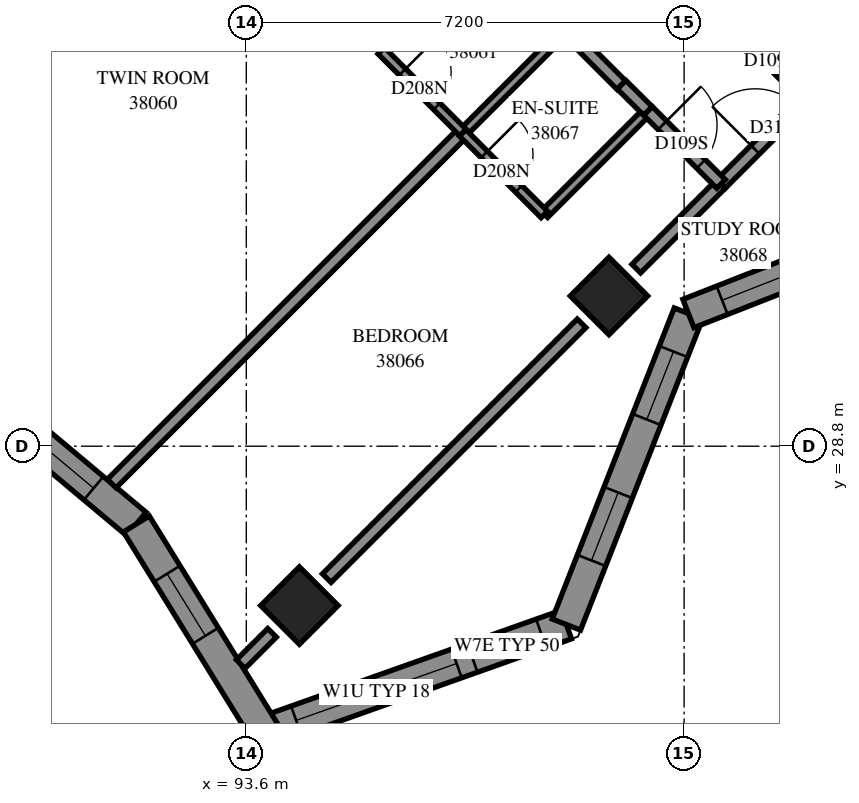
"""IFC4 building model, lengths in metres.
Left out: names, types, materials, properties, quantities, classifications, styles, units other than length and angle.
Written with IfcOpenShell. Run it as: python <this file> out.ifc"""

import sys

from ifc_helpers import new_model, si_unit, direction, frame, frame_2d, origin, origin_2d, place, context, subcontext, project, spatial, polyline, rectangle, outline, extrude, element, fill, save


model = new_model("IFC4")
c1 = context("Model", 3, precision=1e-05, world=origin(), true_north=direction((0.0, 1.0)))
c2 = subcontext(c1, "Body", "Model", "MODEL_VIEW")
j1 = project(units=[si_unit("LENGTHUNIT", "METRE"), si_unit("PLANEANGLEUNIT", "RADIAN")], contexts=[c1])
p1 = place(None, origin())
s1 = spatial("IfcSite", under=j1, at=p1, CompositionType="ELEMENT")
p2 = place(p1, origin())
s2 = spatial("IfcBuilding", under=s1, at=p2, CompositionType="ELEMENT")
p3 = place(p2, frame((0.0, 0.0, 142.2)))
s3 = spatial("IfcBuildingStorey", under=s2, at=p3, CompositionType="ELEMENT", Elevation=142.2)
for number, where, z_axis, x_axis in (
    (1, (99.565, 31.271, 0.0), (0.0, 0.0, 1.0), (0.707, -0.707, 0.0)),
    (2, (94.474, 26.18, 0.0), (0.0, 0.0, 1.0), (0.707, -0.707, 0.0)),
):
    element("IfcColumn", number, at=place(p3, frame(where, z_axis=z_axis, x_axis=x_axis)), inside=s3, PredefinedType="COLUMN", context=c2, shape_type="SweptSolid", body=[
        extrude(rectangle(XDim=0.9, YDim=0.9, at=origin_2d()), origin(), (0.0, 0.0, 1.0), 3.1),
    ])
p4 = place(p3, frame((93.901, 24.106, 0.0), z_axis=(0.0, 0.0, 1.0), x_axis=(0.9424200238, 0.3344316056, 0.0)))
e3 = element("IfcWall", 3, at=p4, inside=s3, PredefinedType="SOLIDWALL", context=c2, shape_type="SweptSolid", body=[
    extrude(outline(polyline([(-0.202, -0.25), (5.381, -0.25), (5.152, 0.25), (0.202, 0.25), (-0.202, -0.25)])), origin(), (0.0, 0.0, 1.0), 3.1),
])
p5 = place(p4, frame((0.551, 0.0, 0.45)))
e4 = element("IfcOpeningElement", 4, at=p5, cuts=e3, PredefinedType="OPENING", context=c2, shape_type="SweptSolid", body=[
    extrude(rectangle(XDim=2.8, YDim=2.5, at=frame_2d((1.4, 1.25))), frame((0.0, 0.26, 0.0), z_axis=(0.0, -1.0, 0.0), x_axis=(1.0, 0.0, 0.0)), (0.0, 0.0, 1.0), 0.52),
])
p6 = place(p4, frame((3.627, 0.0, 0.45)))
e5 = element("IfcOpeningElement", 5, at=p6, cuts=e3, PredefinedType="OPENING", context=c2, shape_type="SweptSolid", body=[
    extrude(rectangle(XDim=1.2, YDim=2.5, at=frame_2d((0.6, 1.25))), frame((0.0, 0.26, 0.0), z_axis=(0.0, -1.0, 0.0), x_axis=(1.0, 0.0, 0.0)), (0.0, 0.0, 1.0), 0.52),
])
p7 = place(p3, frame((98.864, 25.867, 0.0), z_axis=(0.0, 0.0, 1.0), x_axis=(0.3652007286, 0.9309287985, 0.0)))
e6 = element("IfcWall", 6, at=p7, inside=s3, PredefinedType="SOLIDWALL", context=c2, shape_type="SweptSolid", body=[
    extrude(outline(polyline([(-0.114, -0.25), (5.385, -0.25), (5.604, 0.25), (0.114, 0.25), (-0.114, -0.25)])), origin(), (0.0, 0.0, 1.0), 3.1),
])
p8 = place(p7, frame((1.132, 0.0, 0.45)))
e7 = element("IfcOpeningElement", 7, at=p8, cuts=e6, PredefinedType="OPENING", context=c2, shape_type="SweptSolid", body=[
    extrude(rectangle(XDim=1.2, YDim=2.5, at=frame_2d((0.6, 1.25))), frame((0.0, 0.26, 0.0), z_axis=(0.0, -1.0, 0.0), x_axis=(1.0, 0.0, 0.0)), (0.0, 0.0, 1.0), 0.52),
])
p9 = place(p7, frame((3.622, 0.0, 0.45)))
e8 = element("IfcOpeningElement", 8, at=p9, cuts=e6, PredefinedType="OPENING", context=c2, shape_type="SweptSolid", body=[
    extrude(rectangle(XDim=1.2, YDim=2.5, at=frame_2d((0.6, 1.25))), frame((0.0, 0.26, 0.0), z_axis=(0.0, -1.0, 0.0), x_axis=(1.0, 0.0, 0.0)), (0.0, 0.0, 1.0), 0.52),
])
p10 = place(p3, frame((100.871, 30.982, 0.0), z_axis=(0.0, 0.0, 1.0), x_axis=(0.9309312258, 0.3651945412, 0.0)))
e9 = element("IfcWall", 9, at=p10, inside=s3, PredefinedType="SOLIDWALL", context=c2, shape_type="SweptSolid", body=[
    extrude(outline(polyline([(0.109, -0.25), (5.609, -0.25), (5.38, 0.25), (-0.109, 0.25), (0.109, -0.25)])), origin(), (0.0, 0.0, 1.0), 3.1),
])
p11 = place(p10, frame((0.596, 0.0, 0.45)))
e10 = element("IfcOpeningElement", 10, at=p11, cuts=e9, PredefinedType="OPENING", context=c2, shape_type="SweptSolid", body=[
    extrude(rectangle(XDim=2.8, YDim=2.5, at=frame_2d((1.4, 1.25))), frame((0.0, 0.26, 0.0), z_axis=(0.0, -1.0, 0.0), x_axis=(1.0, 0.0, 0.0)), (0.0, 0.0, 1.0), 0.52),
])
p12 = place(p3, frame((88.65, 30.15, 0.0), z_axis=(0.0, 0.0, 1.0), x_axis=(0.7669272434, -0.6417340597, 0.0)))
e11 = element("IfcWall", 11, at=p12, inside=s3, PredefinedType="SOLIDWALL", context=c2, shape_type="SweptSolid", body=[
    extrude(outline(polyline([(-0.022, -0.25), (4.056, -0.25), (4.137, 0.25), (0.022, 0.25), (-0.022, -0.25)])), origin(), (0.0, 0.0, 1.0), 3.1),
])
p13 = place(p12, frame((0.38, 0.0, 0.45)))
e12 = element("IfcOpeningElement", 12, at=p13, cuts=e11, PredefinedType="OPENING", context=c2, shape_type="SweptSolid", body=[
    extrude(rectangle(XDim=2.8, YDim=2.5, at=frame_2d((1.4, 1.25))), frame((0.0, 0.26, 0.0), z_axis=(0.0, -1.0, 0.0), x_axis=(1.0, 0.0, 0.0)), (0.0, 0.0, 1.0), 0.52),
])
p14 = place(p3, frame((91.792, 27.521, 0.0), z_axis=(0.0, 0.0, 1.0), x_axis=(0.5253300119, -0.8508985713, 0.0)))
e13 = element("IfcWall", 13, at=p14, inside=s3, PredefinedType="SOLIDWALL", context=c2, shape_type="SweptSolid", body=[
    extrude(outline(polyline([(0.041, -0.25), (4.215, -0.25), (3.811, 0.25), (-0.041, 0.25), (0.041, -0.25)])), origin(), (0.0, 0.0, 1.0), 3.1),
])
p15 = place(p14, frame((0.962, 0.0, 0.45)))
e14 = element("IfcOpeningElement", 14, at=p15, cuts=e13, PredefinedType="OPENING", context=c2, shape_type="SweptSolid", body=[
    extrude(rectangle(XDim=1.2, YDim=2.5, at=frame_2d((0.6, 1.25))), frame((0.0, 0.26, 0.0), z_axis=(0.0, -1.0, 0.0), x_axis=(1.0, 0.0, 0.0)), (0.0, 0.0, 1.0), 0.52),
])
p16 = place(p3, frame((93.127, 41.379, 0.0), z_axis=(0.0, 0.0, 1.0), x_axis=(0.7071067812, -0.7071067812, 0.0)))
e15 = element("IfcWall", 15, at=p16, inside=s3, PredefinedType="PARTITIONING", context=c2, shape_type="SweptSolid", body=[
    extrude(rectangle(XDim=9.39, YDim=0.2, at=frame_2d((4.695, 0.0))), origin(), (0.0, 0.0, 1.0), 3.1),
])
p17 = place(p16, frame((3.2, 0.0, 0.0)))
e16 = element("IfcOpeningElement", 16, at=p17, cuts=e15, PredefinedType="OPENING", context=c2, shape_type="SweptSolid", body=[
    extrude(rectangle(XDim=0.9, YDim=2.1, at=frame_2d((0.45, 1.05))), frame((0.0, 0.11, 0.0), z_axis=(0.0, -1.0, 0.0), x_axis=(1.0, 0.0, 0.0)), (0.0, 0.0, 1.0), 0.22),
])
p18 = place(p3, frame((86.837, 35.091, 0.0), z_axis=(0.0, 0.0, 1.0), x_axis=(0.7071067812, 0.7071067812, 0.0)))
e17 = element("IfcWall", 17, at=p18, inside=s3, PredefinedType="PARTITIONING", context=c2, shape_type="SweptSolid", body=[
    extrude(rectangle(XDim=8.898, YDim=0.2, at=frame_2d((4.449, 0.0))), origin(), (0.0, 0.0, 1.0), 3.1),
])
p19 = place(p18, frame((7.7, 0.0, 0.0)))
e18 = element("IfcOpeningElement", 18, at=p19, cuts=e17, PredefinedType="OPENING", context=c2, shape_type="SweptSolid", body=[
    extrude(rectangle(XDim=1.0, YDim=2.1, at=frame_2d((0.5, 1.05))), frame((0.0, 0.11, 0.0), z_axis=(0.0, -1.0, 0.0), x_axis=(1.0, 0.0, 0.0)), (0.0, 0.0, 1.0), 0.22),
])
p20 = place(p3, frame((91.387, 28.186, 0.0), z_axis=(0.0, 0.0, 1.0), x_axis=(0.7071067812, 0.7071067812, 0.0)))
e19 = element("IfcWall", 19, at=p20, inside=s3, PredefinedType="PARTITIONING", context=c2, shape_type="SweptSolid", body=[
    extrude(rectangle(XDim=8.164, YDim=0.2, at=frame_2d((4.082, 0.0))), origin(), (0.0, 0.0, 1.0), 3.1),
])
p21 = place(p3, frame((94.923, 26.631, 0.0), z_axis=(0.0, 0.0, 1.0), x_axis=(0.7071067812, 0.7071067812, 0.0)))
e20 = element("IfcWall", 20, at=p21, inside=s3, PredefinedType="PARTITIONING", context=c2, shape_type="SweptSolid", body=[
    extrude(rectangle(XDim=5.926, YDim=0.2, at=frame_2d((2.963, 0.0))), origin(), (0.0, 0.0, 1.0), 2.6),
])
p22 = place(p3, frame((98.503, 32.615, 0.0), z_axis=(0.0, 0.0, 1.0), x_axis=(0.7071067812, 0.7071067812, 0.0)))
e21 = element("IfcWall", 21, at=p22, inside=s3, PredefinedType="PARTITIONING", context=c2, shape_type="SweptSolid", body=[
    extrude(rectangle(XDim=2.401, YDim=0.15, at=frame_2d((1.201, 0.0))), origin(), (0.0, 0.0, 1.0), 3.1),
])
p23 = place(p3, frame((97.163, 33.955, 0.0), z_axis=(0.0, 0.0, 1.0), x_axis=(0.7075233388, 0.706689978, 0.0)))
e22 = element("IfcWall", 22, at=p23, inside=s3, PredefinedType="PARTITIONING", context=c2, shape_type="SweptSolid", body=[
    extrude(rectangle(XDim=2.4, YDim=0.15, at=frame_2d((1.2, 0.0))), origin(), (0.0, 0.0, 1.0), 3.1),
])
p24 = place(p3, frame((95.817, 35.303, 0.0), z_axis=(0.0, 0.0, 1.0), x_axis=(0.7071067812, 0.7071067812, 0.0)))
e23 = element("IfcWall", 23, at=p24, inside=s3, PredefinedType="PARTITIONING", context=c2, shape_type="SweptSolid", body=[
    extrude(rectangle(XDim=2.398, YDim=0.15, at=frame_2d((1.199, 0.0))), origin(), (0.0, 0.0, 1.0), 3.1),
])
p25 = place(p3, frame((101.403, 33.111, 0.0), z_axis=(0.0, 0.0, 1.0), x_axis=(0.7071067812, 0.7071067812, 0.0)))
e24 = element("IfcWall", 24, at=p25, inside=s3, PredefinedType="PARTITIONING", context=c2, shape_type="SweptSolid", body=[
    extrude(rectangle(XDim=2.0, YDim=0.2, at=frame_2d((1.0, 0.0))), origin(), (0.0, 0.0, 1.0), 2.6),
])
p26 = place(p25, frame((0.802, 0.0, 0.0)))
e25 = element("IfcOpeningElement", 25, at=p26, cuts=e24, PredefinedType="OPENING", context=c2, shape_type="SweptSolid", body=[
    extrude(rectangle(XDim=1.0, YDim=2.1, at=frame_2d((0.5, 1.05))), frame((0.0, 0.11, 0.0), z_axis=(0.0, -1.0, 0.0), x_axis=(1.0, 0.0, 0.0)), (0.0, 0.0, 1.0), 0.22),
])
p27 = place(p3, frame((100.013, 31.721, 0.0), z_axis=(0.0, 0.0, 1.0), x_axis=(0.7071067812, 0.7071067812, 0.0)))
e26 = element("IfcWall", 26, at=p27, inside=s3, PredefinedType="PARTITIONING", context=c2, shape_type="SweptSolid", body=[
    extrude(rectangle(XDim=1.966, YDim=0.2, at=frame_2d((0.983, 0.0))), origin(), (0.0, 0.0, 1.0), 2.6),
])
p28 = place(p3, frame((97.157, 33.955, 0.0), z_axis=(0.0, 0.0, 1.0), x_axis=(0.7071067812, -0.7071067812, 0.0)))
e27 = element("IfcWall", 27, at=p28, inside=s3, PredefinedType="PARTITIONING", context=c2, shape_type="SweptSolid", body=[
    extrude(rectangle(XDim=1.901, YDim=0.15, at=frame_2d((0.95, 0.0))), origin(), (0.0, 0.0, 1.0), 3.1),
])
p29 = place(p28, frame((0.506, 0.0, 0.0)))
e28 = element("IfcOpeningElement", 28, at=p29, cuts=e27, PredefinedType="OPENING", context=c2, shape_type="SweptSolid", body=[
    extrude(rectangle(XDim=0.8, YDim=2.1, at=frame_2d((0.4, 1.05))), frame((0.0, 0.085, 0.0), z_axis=(0.0, -1.0, 0.0), x_axis=(1.0, 0.0, 0.0)), (0.0, 0.0, 1.0), 0.17),
])
p30 = place(p3, frame((95.82, 35.304, 0.0), z_axis=(0.0, 0.0, 1.0), x_axis=(0.7065800724, -0.7076330979, 0.0)))
e29 = element("IfcWall", 29, at=p30, inside=s3, PredefinedType="PARTITIONING", context=c2, shape_type="SweptSolid", body=[
    extrude(rectangle(XDim=1.899, YDim=0.15, at=frame_2d((0.95, 0.0))), origin(), (0.0, 0.0, 1.0), 3.1),
])
p31 = place(p30, frame((0.493, 0.0, 0.0)))
e30 = element("IfcOpeningElement", 30, at=p31, cuts=e29, PredefinedType="OPENING", context=c2, shape_type="SweptSolid", body=[
    extrude(rectangle(XDim=0.8, YDim=2.1, at=frame_2d((0.4, 1.05))), frame((0.0, 0.085, 0.0), z_axis=(0.0, -1.0, 0.0), x_axis=(1.0, 0.0, 0.0)), (0.0, 0.0, 1.0), 0.17),
])
p32 = place(p3, frame((100.205, 34.315, 0.0), z_axis=(0.0, 0.0, 1.0), x_axis=(0.7071067812, -0.7071067812, 0.0)))
e31 = element("IfcWall", 31, at=p32, inside=s3, PredefinedType="PARTITIONING", context=c2, shape_type="SweptSolid", body=[
    extrude(rectangle(XDim=1.7, YDim=0.2, at=frame_2d((0.85, 0.0))), origin(), (0.0, 0.0, 1.0), 3.1),
])
p33 = place(p32, frame((0.335, 0.0, 0.0)))
e32 = element("IfcOpeningElement", 32, at=p33, cuts=e31, PredefinedType="OPENING", context=c2, shape_type="SweptSolid", body=[
    extrude(rectangle(XDim=0.9, YDim=2.1, at=frame_2d((0.45, 1.05))), frame((0.0, 0.11, 0.0), z_axis=(0.0, -1.0, 0.0), x_axis=(1.0, 0.0, 0.0)), (0.0, 0.0, 1.0), 0.22),
])
p34 = place(p3, frame((101.619, 35.729, 0.0), z_axis=(0.0, 0.0, 1.0), x_axis=(0.7071067812, -0.7071067812, 0.0)))
e33 = element("IfcWall", 33, at=p34, inside=s3, PredefinedType="PARTITIONING", context=c2, shape_type="SweptSolid", body=[
    extrude(rectangle(XDim=1.7, YDim=0.2, at=frame_2d((0.85, 0.0))), origin(), (0.0, 0.0, 1.0), 3.1),
])
p35 = place(p34, frame((0.4, 0.0, 0.0)))
e34 = element("IfcOpeningElement", 34, at=p35, cuts=e33, PredefinedType="OPENING", context=c2, shape_type="SweptSolid", body=[
    extrude(rectangle(XDim=0.9, YDim=2.1, at=frame_2d((0.45, 1.05))), frame((0.0, 0.11, 0.0), z_axis=(0.0, -1.0, 0.0), x_axis=(1.0, 0.0, 0.0)), (0.0, 0.0, 1.0), 0.22),
])
p36 = place(p3, frame((93.509, 25.216, 0.0), z_axis=(0.0, 0.0, 1.0), x_axis=(0.7071755157, 0.7070380399, 0.0)))
e35 = element("IfcWall", 35, at=p36, inside=s3, PredefinedType="PARTITIONING", context=c2, shape_type="SweptSolid", body=[
    extrude(rectangle(XDim=0.727, YDim=0.2, at=frame_2d((0.364, 0.0))), origin(), (0.0, 0.0, 1.0), 3.1),
])
p37 = place(p3, frame((99.772, 34.744, 0.0), z_axis=(0.0, 0.0, 1.0), x_axis=(0.7087454925, -0.7054642634, 0.0)))
e36 = element("IfcWall", 36, at=p37, inside=s3, PredefinedType="PARTITIONING", context=c2, shape_type="SweptSolid", body=[
    extrude(rectangle(XDim=0.61, YDim=0.2, at=frame_2d((0.305, 0.0))), origin(), (0.0, 0.0, 1.0), 3.1),
])
p38 = place(p5, origin())
e37 = element("IfcWindow", 37, at=p38, inside=s3, PartitioningType="SINGLE_PANEL", PredefinedType="WINDOW", context=c2, shape_type="SweptSolid", body=[
    extrude(rectangle(XDim=2.8, YDim=2.5, at=frame_2d((1.4, 1.25))), frame((0.0, 0.18, 0.0), z_axis=(0.0, -1.0, 0.0), x_axis=(1.0, 0.0, 0.0)), (0.0, 0.0, 1.0), 0.06),
])
fill(e4, e37)
p39 = place(p6, origin())
e38 = element("IfcWindow", 38, at=p39, inside=s3, PartitioningType="SINGLE_PANEL", PredefinedType="WINDOW", context=c2, shape_type="SweptSolid", body=[
    extrude(rectangle(XDim=1.2, YDim=2.5, at=frame_2d((0.6, 1.25))), frame((0.0, 0.18, 0.0), z_axis=(0.0, -1.0, 0.0), x_axis=(1.0, 0.0, 0.0)), (0.0, 0.0, 1.0), 0.06),
])
fill(e5, e38)
p40 = place(p8, origin())
e39 = element("IfcWindow", 39, at=p40, inside=s3, PartitioningType="SINGLE_PANEL", PredefinedType="WINDOW", context=c2, shape_type="SweptSolid", body=[
    extrude(rectangle(XDim=1.2, YDim=2.5, at=frame_2d((0.6, 1.25))), frame((0.0, 0.18, 0.0), z_axis=(0.0, -1.0, 0.0), x_axis=(1.0, 0.0, 0.0)), (0.0, 0.0, 1.0), 0.06),
])
fill(e7, e39)
p41 = place(p9, origin())
e40 = element("IfcWindow", 40, at=p41, inside=s3, PartitioningType="SINGLE_PANEL", PredefinedType="WINDOW", context=c2, shape_type="SweptSolid", body=[
    extrude(rectangle(XDim=1.2, YDim=2.5, at=frame_2d((0.6, 1.25))), frame((0.0, 0.18, 0.0), z_axis=(0.0, -1.0, 0.0), x_axis=(1.0, 0.0, 0.0)), (0.0, 0.0, 1.0), 0.06),
])
fill(e8, e40)
p42 = place(p11, origin())
e41 = element("IfcWindow", 41, at=p42, inside=s3, PartitioningType="SINGLE_PANEL", PredefinedType="WINDOW", context=c2, shape_type="SweptSolid", body=[
    extrude(rectangle(XDim=2.8, YDim=2.5, at=frame_2d((1.4, 1.25))), frame((0.0, 0.18, 0.0), z_axis=(0.0, -1.0, 0.0), x_axis=(1.0, 0.0, 0.0)), (0.0, 0.0, 1.0), 0.06),
])
fill(e10, e41)
p43 = place(p13, origin())
e42 = element("IfcWindow", 42, at=p43, inside=s3, PartitioningType="SINGLE_PANEL", PredefinedType="WINDOW", context=c2, shape_type="SweptSolid", body=[
    extrude(rectangle(XDim=2.8, YDim=2.5, at=frame_2d((1.4, 1.25))), frame((0.0, 0.18, 0.0), z_axis=(0.0, -1.0, 0.0), x_axis=(1.0, 0.0, 0.0)), (0.0, 0.0, 1.0), 0.06),
])
fill(e12, e42)
p44 = place(p15, origin())
e43 = element("IfcWindow", 43, at=p44, inside=s3, PartitioningType="SINGLE_PANEL", PredefinedType="WINDOW", context=c2, shape_type="SweptSolid", body=[
    extrude(rectangle(XDim=1.2, YDim=2.5, at=frame_2d((0.6, 1.25))), frame((0.0, 0.18, 0.0), z_axis=(0.0, -1.0, 0.0), x_axis=(1.0, 0.0, 0.0)), (0.0, 0.0, 1.0), 0.06),
])
fill(e14, e43)
p45 = place(p31, origin())
e44 = element("IfcDoor", 44, at=p45, inside=s3, OperationType="SINGLE_SWING_RIGHT", PredefinedType="DOOR", context=c2, shape_type="SweptSolid", body=[
    extrude(rectangle(XDim=0.8, YDim=2.1, at=frame_2d((0.4, 1.05))), frame((0.0, 0.025, 0.0), z_axis=(0.0, -1.0, 0.0), x_axis=(1.0, 0.0, 0.0)), (0.0, 0.0, 1.0), 0.05),
])
fill(e30, e44)
p46 = place(p35, origin())
e45 = element("IfcDoor", 45, at=p46, inside=s3, OperationType="SINGLE_SWING_RIGHT", PredefinedType="DOOR", context=c2, shape_type="SweptSolid", body=[
    extrude(rectangle(XDim=0.9, YDim=2.1, at=frame_2d((0.45, 1.05))), frame((0.0, 0.025, 0.0), z_axis=(0.0, -1.0, 0.0), x_axis=(1.0, 0.0, 0.0)), (0.0, 0.0, 1.0), 0.05),
])
fill(e34, e45)
p47 = place(p33, origin())
e46 = element("IfcDoor", 46, at=p47, inside=s3, OperationType="SINGLE_SWING_LEFT", PredefinedType="DOOR", context=c2, shape_type="SweptSolid", body=[
    extrude(rectangle(XDim=0.9, YDim=2.1, at=frame_2d((0.45, 1.05))), frame((0.0, 0.025, 0.0), z_axis=(0.0, -1.0, 0.0), x_axis=(1.0, 0.0, 0.0)), (0.0, 0.0, 1.0), 0.05),
])
fill(e32, e46)
p48 = place(p29, origin())
e47 = element("IfcDoor", 47, at=p48, inside=s3, OperationType="SINGLE_SWING_RIGHT", PredefinedType="DOOR", context=c2, shape_type="SweptSolid", body=[
    extrude(rectangle(XDim=0.8, YDim=2.1, at=frame_2d((0.4, 1.05))), frame((0.0, 0.025, 0.0), z_axis=(0.0, -1.0, 0.0), x_axis=(1.0, 0.0, 0.0)), (0.0, 0.0, 1.0), 0.05),
])
fill(e28, e47)
p49 = place(p26, origin())
e48 = element("IfcDoor", 48, at=p49, inside=s3, OperationType="SINGLE_SWING_RIGHT", PredefinedType="DOOR", context=c2, shape_type="SweptSolid", body=[
    extrude(rectangle(XDim=1.0, YDim=2.1, at=frame_2d((0.5, 1.05))), frame((0.0, 0.025, 0.0), z_axis=(0.0, -1.0, 0.0), x_axis=(1.0, 0.0, 0.0)), (0.0, 0.0, 1.0), 0.05),
])
fill(e25, e48)
save(model, sys.argv[1])
